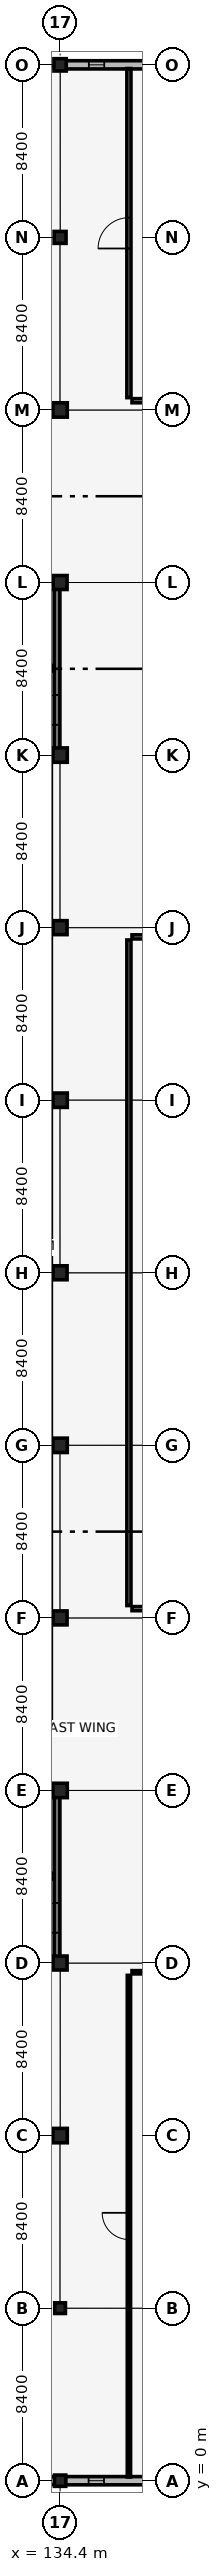
"""IFC4 building model, lengths in metres.
Left out: names, types, materials, properties, quantities, classifications, styles, units other than length and angle.
Written with IfcOpenShell. Run it as: python <this file> out.ifc"""

import sys

from ifc_helpers import new_model, si_unit, direction, frame, frame_2d, origin, origin_2d, place, context, subcontext, project, spatial, rectangle, extrude, element, fill, save


model = new_model("IFC4")
c1 = context("Model", 3, precision=1e-05, world=origin(), true_north=direction((0.0, 1.0)))
c2 = subcontext(c1, "Body", "Model", "MODEL_VIEW")
j1 = project(units=[si_unit("LENGTHUNIT", "METRE"), si_unit("PLANEANGLEUNIT", "RADIAN")], contexts=[c1])
p1 = place(None, origin())
s1 = spatial("IfcSite", under=j1, at=p1, CompositionType="ELEMENT")
p2 = place(p1, origin())
s2 = spatial("IfcBuilding", under=s1, at=p2, CompositionType="ELEMENT")
p3 = place(p2, frame((0.0, 0.0, 9.86)))
s3 = spatial("IfcBuildingStorey", under=s2, at=p3, CompositionType="ELEMENT", Elevation=9.86)
p4 = place(p3, frame((126.15, 25.35, 0.0), z_axis=(0.0, 0.0, 1.0), x_axis=(1.0, 0.0, 0.0)))
e1 = element("IfcWall", 1, at=p4, inside=s3, PredefinedType="SHEAR", context=c2, shape_type="SweptSolid", body=[
    extrude(rectangle(XDim=8.1, YDim=0.28, at=frame_2d((4.05, 0.0))), origin(), (0.0, 0.0, 1.0), 3.78),
])
p5 = place(p4, frame((0.485, 0.0, 0.0)))
e2 = element("IfcOpeningElement", 2, at=p5, cuts=e1, PredefinedType="OPENING", context=c2, shape_type="SweptSolid", body=[
    extrude(rectangle(XDim=1.0, YDim=2.15, at=frame_2d((0.5, 1.075))), frame((0.0, 0.15, 0.0), z_axis=(0.0, -1.0, 0.0), x_axis=(1.0, 0.0, 0.0)), (0.0, 0.0, 1.0), 0.3),
])
p6 = place(p3, frame((126.15, 33.45, 0.0), z_axis=(0.0, 0.0, 1.0), x_axis=(1.0, 0.0, 0.0)))
e3 = element("IfcWall", 3, at=p6, inside=s3, PredefinedType="SHEAR", context=c2, shape_type="SweptSolid", body=[
    extrude(rectangle(XDim=8.1, YDim=0.28, at=frame_2d((4.05, 0.0))), origin(), (0.0, 0.0, 1.0), 3.78),
])
p7 = place(p3, frame((134.25, 25.35, 0.0), z_axis=(0.0, 0.0, 1.0), x_axis=(0.0, 1.0, 0.0)))
e4 = element("IfcWall", 4, at=p7, inside=s3, PredefinedType="SHEAR", context=c2, shape_type="SweptSolid", body=[
    extrude(rectangle(XDim=8.1, YDim=0.28, at=frame_2d((4.05, 0.0))), origin(), (0.0, 0.0, 1.0), 3.78),
])
p8 = place(p7, frame((1.325, 0.0, 0.0)))
e5 = element("IfcOpeningElement", 5, at=p8, cuts=e4, PredefinedType="OPENING", context=c2, shape_type="SweptSolid", body=[
    extrude(rectangle(XDim=1.45, YDim=2.15, at=frame_2d((0.725, 1.075))), frame((0.0, 0.15, 0.0), z_axis=(0.0, -1.0, 0.0), x_axis=(1.0, 0.0, 0.0)), (0.0, 0.0, 1.0), 0.3),
])
p9 = place(p3, frame((126.3, 29.43, 0.0), z_axis=(0.0, 0.0, 1.0), x_axis=(1.0, 0.0, 0.0)))
e6 = element("IfcWall", 6, at=p9, inside=s3, PredefinedType="SHEAR", context=c2, shape_type="SweptSolid", body=[
    extrude(rectangle(XDim=7.8, YDim=0.28, at=frame_2d((3.9, 0.0))), origin(), (0.0, 0.0, 1.0), 3.78),
])
p10 = place(p9, frame((6.2, 0.0, 0.0)))
e7 = element("IfcOpeningElement", 7, at=p10, cuts=e6, PredefinedType="OPENING", context=c2, shape_type="SweptSolid", body=[
    extrude(rectangle(XDim=1.35, YDim=2.15, at=frame_2d((0.675, 1.075))), frame((0.0, 0.15, 0.0), z_axis=(0.0, -1.0, 0.0), x_axis=(1.0, 0.0, 0.0)), (0.0, 0.0, 1.0), 0.3),
])
p11 = place(p3, frame((126.15, 84.15, 0.0), z_axis=(0.0, 0.0, 1.0), x_axis=(1.0, 0.0, 0.0)))
e8 = element("IfcWall", 8, at=p11, inside=s3, PredefinedType="SHEAR", context=c2, shape_type="SweptSolid", body=[
    extrude(rectangle(XDim=8.1, YDim=0.28, at=frame_2d((4.05, 0.0))), origin(), (0.0, 0.0, 1.0), 3.78),
])
p12 = place(p11, frame((0.485, 0.0, 0.0)))
e9 = element("IfcOpeningElement", 9, at=p12, cuts=e8, PredefinedType="OPENING", context=c2, shape_type="SweptSolid", body=[
    extrude(rectangle(XDim=1.0, YDim=2.15, at=frame_2d((0.5, 1.075))), frame((0.0, 0.15, 0.0), z_axis=(0.0, -1.0, 0.0), x_axis=(1.0, 0.0, 0.0)), (0.0, 0.0, 1.0), 0.3),
])
p13 = place(p3, frame((126.15, 92.25, 0.0), z_axis=(0.0, 0.0, 1.0), x_axis=(1.0, 0.0, 0.0)))
e10 = element("IfcWall", 10, at=p13, inside=s3, PredefinedType="SHEAR", context=c2, shape_type="SweptSolid", body=[
    extrude(rectangle(XDim=8.1, YDim=0.28, at=frame_2d((4.05, 0.0))), origin(), (0.0, 0.0, 1.0), 3.78),
])
p14 = place(p3, frame((134.25, 84.15, 0.0), z_axis=(0.0, 0.0, 1.0), x_axis=(0.0, 1.0, 0.0)))
e11 = element("IfcWall", 11, at=p14, inside=s3, PredefinedType="SHEAR", context=c2, shape_type="SweptSolid", body=[
    extrude(rectangle(XDim=8.1, YDim=0.28, at=frame_2d((4.05, 0.0))), origin(), (0.0, 0.0, 1.0), 3.78),
])
p15 = place(p14, frame((1.325, 0.0, 0.0)))
e12 = element("IfcOpeningElement", 12, at=p15, cuts=e11, PredefinedType="OPENING", context=c2, shape_type="SweptSolid", body=[
    extrude(rectangle(XDim=1.45, YDim=2.15, at=frame_2d((0.725, 1.075))), frame((0.0, 0.15, 0.0), z_axis=(0.0, -1.0, 0.0), x_axis=(1.0, 0.0, 0.0)), (0.0, 0.0, 1.0), 0.3),
])
p16 = place(p3, frame((126.3, 88.23, 0.0), z_axis=(0.0, 0.0, 1.0), x_axis=(1.0, 0.0, 0.0)))
e13 = element("IfcWall", 13, at=p16, inside=s3, PredefinedType="SHEAR", context=c2, shape_type="SweptSolid", body=[
    extrude(rectangle(XDim=7.8, YDim=0.28, at=frame_2d((3.9, 0.0))), origin(), (0.0, 0.0, 1.0), 3.78),
])
p17 = place(p16, frame((6.2, 0.0, 0.0)))
e14 = element("IfcOpeningElement", 14, at=p17, cuts=e13, PredefinedType="OPENING", context=c2, shape_type="SweptSolid", body=[
    extrude(rectangle(XDim=1.35, YDim=2.15, at=frame_2d((0.675, 1.075))), frame((0.0, 0.15, 0.0), z_axis=(0.0, -1.0, 0.0), x_axis=(1.0, 0.0, 0.0)), (0.0, 0.0, 1.0), 0.3),
])
p18 = place(p3, frame((134.4, 0.0, 0.0), z_axis=(0.0, 0.0, 1.0), x_axis=(1.0, 0.0, 0.0)))
e15 = element("IfcColumn", 15, at=p18, inside=s3, PredefinedType="COLUMN", context=c2, shape_type="SweptSolid", body=[
    extrude(rectangle(XDim=0.55, YDim=0.55, at=origin_2d()), origin(), (0.0, 0.0, 1.0), 3.78),
])
p19 = place(p3, frame((134.4, 8.4, 0.0), z_axis=(0.0, 0.0, 1.0), x_axis=(1.0, 0.0, 0.0)))
e16 = element("IfcColumn", 16, at=p19, inside=s3, PredefinedType="COLUMN", context=c2, shape_type="SweptSolid", body=[
    extrude(rectangle(XDim=0.52, YDim=0.52, at=origin_2d()), origin(), (0.0, 0.0, 1.0), 3.78),
])
p20 = place(p3, frame((134.4, 16.8, 0.0), z_axis=(0.0, 0.0, 1.0), x_axis=(1.0, 0.0, 0.0)))
e17 = element("IfcColumn", 17, at=p20, inside=s3, PredefinedType="COLUMN", context=c2, shape_type="SweptSolid", body=[
    extrude(rectangle(XDim=0.7, YDim=0.7, at=origin_2d()), origin(), (0.0, 0.0, 1.0), 3.78),
])
p21 = place(p3, frame((134.4, 25.2, 0.0), z_axis=(0.0, 0.0, 1.0), x_axis=(1.0, 0.0, 0.0)))
e18 = element("IfcColumn", 18, at=p21, inside=s3, PredefinedType="COLUMN", context=c2, shape_type="SweptSolid", body=[
    extrude(rectangle(XDim=0.68, YDim=0.68, at=origin_2d()), origin(), (0.0, 0.0, 1.0), 3.78),
])
p22 = place(p3, frame((134.4, 33.6, 0.0), z_axis=(0.0, 0.0, 1.0), x_axis=(1.0, 0.0, 0.0)))
e19 = element("IfcColumn", 19, at=p22, inside=s3, PredefinedType="COLUMN", context=c2, shape_type="SweptSolid", body=[
    extrude(rectangle(XDim=0.7, YDim=0.7, at=origin_2d()), origin(), (0.0, 0.0, 1.0), 3.78),
])
p23 = place(p3, frame((134.4, 42.0, 0.0), z_axis=(0.0, 0.0, 1.0), x_axis=(1.0, 0.0, 0.0)))
e20 = element("IfcColumn", 20, at=p23, inside=s3, PredefinedType="COLUMN", context=c2, shape_type="SweptSolid", body=[
    extrude(rectangle(XDim=0.68, YDim=0.68, at=origin_2d()), origin(), (0.0, 0.0, 1.0), 3.78),
])
p24 = place(p3, frame((134.4, 50.4, 0.0), z_axis=(0.0, 0.0, 1.0), x_axis=(1.0, 0.0, 0.0)))
e21 = element("IfcColumn", 21, at=p24, inside=s3, PredefinedType="COLUMN", context=c2, shape_type="SweptSolid", body=[
    extrude(rectangle(XDim=0.7, YDim=0.7, at=origin_2d()), origin(), (0.0, 0.0, 1.0), 3.78),
])
p25 = place(p3, frame((134.4, 58.8, 0.0), z_axis=(0.0, 0.0, 1.0), x_axis=(1.0, 0.0, 0.0)))
e22 = element("IfcColumn", 22, at=p25, inside=s3, PredefinedType="COLUMN", context=c2, shape_type="SweptSolid", body=[
    extrude(rectangle(XDim=0.68, YDim=0.68, at=origin_2d()), origin(), (0.0, 0.0, 1.0), 3.78),
])
p26 = place(p3, frame((134.4, 67.2, 0.0), z_axis=(0.0, 0.0, 1.0), x_axis=(1.0, 0.0, 0.0)))
e23 = element("IfcColumn", 23, at=p26, inside=s3, PredefinedType="COLUMN", context=c2, shape_type="SweptSolid", body=[
    extrude(rectangle(XDim=0.7, YDim=0.7, at=origin_2d()), origin(), (0.0, 0.0, 1.0), 3.78),
])
p27 = place(p3, frame((134.4, 75.6, 0.0), z_axis=(0.0, 0.0, 1.0), x_axis=(1.0, 0.0, 0.0)))
e24 = element("IfcColumn", 24, at=p27, inside=s3, PredefinedType="COLUMN", context=c2, shape_type="SweptSolid", body=[
    extrude(rectangle(XDim=0.68, YDim=0.68, at=origin_2d()), origin(), (0.0, 0.0, 1.0), 3.78),
])
p28 = place(p3, frame((134.4, 84.0, 0.0), z_axis=(0.0, 0.0, 1.0), x_axis=(1.0, 0.0, 0.0)))
e25 = element("IfcColumn", 25, at=p28, inside=s3, PredefinedType="COLUMN", context=c2, shape_type="SweptSolid", body=[
    extrude(rectangle(XDim=0.7, YDim=0.7, at=origin_2d()), origin(), (0.0, 0.0, 1.0), 3.78),
])
p29 = place(p3, frame((134.4, 92.4, 0.0), z_axis=(0.0, 0.0, 1.0), x_axis=(1.0, 0.0, 0.0)))
e26 = element("IfcColumn", 26, at=p29, inside=s3, PredefinedType="COLUMN", context=c2, shape_type="SweptSolid", body=[
    extrude(rectangle(XDim=0.68, YDim=0.68, at=origin_2d()), origin(), (0.0, 0.0, 1.0), 3.78),
])
p30 = place(p3, frame((134.4, 100.8, 0.0), z_axis=(0.0, 0.0, 1.0), x_axis=(1.0, 0.0, 0.0)))
e27 = element("IfcColumn", 27, at=p30, inside=s3, PredefinedType="COLUMN", context=c2, shape_type="SweptSolid", body=[
    extrude(rectangle(XDim=0.7, YDim=0.7, at=origin_2d()), origin(), (0.0, 0.0, 1.0), 3.78),
])
p31 = place(p3, frame((134.4, 109.2, 0.0), z_axis=(0.0, 0.0, 1.0), x_axis=(1.0, 0.0, 0.0)))
e28 = element("IfcColumn", 28, at=p31, inside=s3, PredefinedType="COLUMN", context=c2, shape_type="SweptSolid", body=[
    extrude(rectangle(XDim=0.58, YDim=0.58, at=origin_2d()), origin(), (0.0, 0.0, 1.0), 3.78),
])
p32 = place(p3, frame((134.4, 117.6, 0.0), z_axis=(0.0, 0.0, 1.0), x_axis=(1.0, 0.0, 0.0)))
e29 = element("IfcColumn", 29, at=p32, inside=s3, PredefinedType="COLUMN", context=c2, shape_type="SweptSolid", body=[
    extrude(rectangle(XDim=0.6, YDim=0.6, at=origin_2d()), origin(), (0.0, 0.0, 1.0), 3.78),
])
p33 = place(p3, frame((126.235, 0.0, 0.0), z_axis=(0.0, 0.0, 1.0), x_axis=(1.0, 0.0, 0.0)))
e30 = element("IfcWall", 30, at=p33, inside=s3, PredefinedType="SOLIDWALL", context=c2, shape_type="SweptSolid", body=[
    extrude(rectangle(XDim=7.905, YDim=0.38, at=frame_2d((3.952, 0.0))), origin(), (0.0, 0.0, 1.0), 3.01),
])
p34 = place(p33, frame((1.127, 0.0, 0.7)))
e31 = element("IfcOpeningElement", 31, at=p34, cuts=e30, PredefinedType="OPENING", context=c2, shape_type="SweptSolid", body=[
    extrude(rectangle(XDim=0.75, YDim=2.1, at=frame_2d((0.375, 1.05))), frame((0.0, 0.2, 0.0), z_axis=(0.0, -1.0, 0.0), x_axis=(1.0, 0.0, 0.0)), (0.0, 0.0, 1.0), 0.4),
])
p35 = place(p33, frame((2.708, 0.0, 0.7)))
e32 = element("IfcOpeningElement", 32, at=p35, cuts=e30, PredefinedType="OPENING", context=c2, shape_type="SweptSolid", body=[
    extrude(rectangle(XDim=0.75, YDim=2.1, at=frame_2d((0.375, 1.05))), frame((0.0, 0.2, 0.0), z_axis=(0.0, -1.0, 0.0), x_axis=(1.0, 0.0, 0.0)), (0.0, 0.0, 1.0), 0.4),
])
p36 = place(p33, frame((4.447, 0.0, 0.7)))
e33 = element("IfcOpeningElement", 33, at=p36, cuts=e30, PredefinedType="OPENING", context=c2, shape_type="SweptSolid", body=[
    extrude(rectangle(XDim=0.75, YDim=2.1, at=frame_2d((0.375, 1.05))), frame((0.0, 0.2, 0.0), z_axis=(0.0, -1.0, 0.0), x_axis=(1.0, 0.0, 0.0)), (0.0, 0.0, 1.0), 0.4),
])
p37 = place(p33, frame((6.028, 0.0, 0.7)))
e34 = element("IfcOpeningElement", 34, at=p37, cuts=e30, PredefinedType="OPENING", context=c2, shape_type="SweptSolid", body=[
    extrude(rectangle(XDim=0.75, YDim=2.1, at=frame_2d((0.375, 1.05))), frame((0.0, 0.2, 0.0), z_axis=(0.0, -1.0, 0.0), x_axis=(1.0, 0.0, 0.0)), (0.0, 0.0, 1.0), 0.4),
])
p38 = place(p3, frame((134.66, 0.0, 0.0), z_axis=(0.0, 0.0, 1.0), x_axis=(1.0, 0.0, 0.0)))
e35 = element("IfcWall", 35, at=p38, inside=s3, PredefinedType="SOLIDWALL", context=c2, shape_type="SweptSolid", body=[
    extrude(rectangle(XDim=7.905, YDim=0.4, at=frame_2d((3.953, 0.0))), origin(), (0.0, 0.0, 1.0), 3.01),
])
p39 = place(p38, frame((1.127, 0.0, 0.7)))
e36 = element("IfcOpeningElement", 36, at=p39, cuts=e35, PredefinedType="OPENING", context=c2, shape_type="SweptSolid", body=[
    extrude(rectangle(XDim=0.75, YDim=2.1, at=frame_2d((0.375, 1.05))), frame((0.0, 0.21, 0.0), z_axis=(0.0, -1.0, 0.0), x_axis=(1.0, 0.0, 0.0)), (0.0, 0.0, 1.0), 0.42),
])
p40 = place(p38, frame((4.447, 0.0, 0.7)))
e37 = element("IfcOpeningElement", 37, at=p40, cuts=e35, PredefinedType="OPENING", context=c2, shape_type="SweptSolid", body=[
    extrude(rectangle(XDim=0.75, YDim=2.1, at=frame_2d((0.375, 1.05))), frame((0.0, 0.21, 0.0), z_axis=(0.0, -1.0, 0.0), x_axis=(1.0, 0.0, 0.0)), (0.0, 0.0, 1.0), 0.42),
])
p41 = place(p38, frame((6.028, 0.0, 0.7)))
e38 = element("IfcOpeningElement", 38, at=p41, cuts=e35, PredefinedType="OPENING", context=c2, shape_type="SweptSolid", body=[
    extrude(rectangle(XDim=0.75, YDim=2.1, at=frame_2d((0.375, 1.05))), frame((0.0, 0.21, 0.0), z_axis=(0.0, -1.0, 0.0), x_axis=(1.0, 0.0, 0.0)), (0.0, 0.0, 1.0), 0.42),
])
p42 = place(p3, frame((134.685, 117.6, 0.0), z_axis=(0.0, 0.0, 1.0), x_axis=(1.0, 0.0, 0.0)))
e39 = element("IfcWall", 39, at=p42, inside=s3, PredefinedType="SOLIDWALL", context=c2, shape_type="SweptSolid", body=[
    extrude(rectangle(XDim=7.84, YDim=0.4, at=frame_2d((3.92, 0.0))), origin(), (0.0, 0.0, 1.0), 3.01),
])
p43 = place(p42, frame((1.115, 0.0, 0.7)))
e40 = element("IfcOpeningElement", 40, at=p43, cuts=e39, PredefinedType="OPENING", context=c2, shape_type="SweptSolid", body=[
    extrude(rectangle(XDim=0.75, YDim=2.1, at=frame_2d((0.375, 1.05))), frame((0.0, 0.21, 0.0), z_axis=(0.0, -1.0, 0.0), x_axis=(1.0, 0.0, 0.0)), (0.0, 0.0, 1.0), 0.42),
])
p44 = place(p42, frame((4.407, 0.0, 0.7)))
e41 = element("IfcOpeningElement", 41, at=p44, cuts=e39, PredefinedType="OPENING", context=c2, shape_type="SweptSolid", body=[
    extrude(rectangle(XDim=0.75, YDim=2.1, at=frame_2d((0.375, 1.05))), frame((0.0, 0.21, 0.0), z_axis=(0.0, -1.0, 0.0), x_axis=(1.0, 0.0, 0.0)), (0.0, 0.0, 1.0), 0.42),
])
p45 = place(p42, frame((5.975, 0.0, 0.7)))
e42 = element("IfcOpeningElement", 42, at=p45, cuts=e39, PredefinedType="OPENING", context=c2, shape_type="SweptSolid", body=[
    extrude(rectangle(XDim=0.75, YDim=2.1, at=frame_2d((0.375, 1.05))), frame((0.0, 0.21, 0.0), z_axis=(0.0, -1.0, 0.0), x_axis=(1.0, 0.0, 0.0)), (0.0, 0.0, 1.0), 0.42),
])
p46 = place(p3, frame((137.75, 0.18, 0.0), z_axis=(0.0, 0.0, 1.0), x_axis=(0.0, 1.0, 0.0)))
e43 = element("IfcWall", 43, at=p46, inside=s3, PredefinedType="PARTITIONING", context=c2, shape_type="SweptSolid", body=[
    extrude(rectangle(XDim=24.42, YDim=0.16, at=frame_2d((12.21, 0.0))), origin(), (0.0, 0.0, 1.0), 2.91),
])
p47 = place(p46, frame((11.56, 0.0, 0.0)))
e44 = element("IfcOpeningElement", 44, at=p47, cuts=e43, PredefinedType="OPENING", context=c2, shape_type="SweptSolid", body=[
    extrude(rectangle(XDim=1.3, YDim=2.2, at=frame_2d((0.65, 1.1))), frame((0.0, 0.09, 0.0), z_axis=(0.0, -1.0, 0.0), x_axis=(1.0, 0.0, 0.0)), (0.0, 0.0, 1.0), 0.18),
])
p48 = place(p3, frame((137.9, 24.75, 0.0), z_axis=(0.0, 0.0, 1.0), x_axis=(1.0, 0.0, 0.0)))
e45 = element("IfcWall", 45, at=p48, inside=s3, PredefinedType="PARTITIONING", context=c2, shape_type="SweptSolid", body=[
    extrude(rectangle(XDim=4.49, YDim=0.16, at=frame_2d((2.245, 0.0))), origin(), (0.0, 0.0, 1.0), 3.78),
])
p49 = place(p3, frame((137.9, 75.15, 0.0), z_axis=(0.0, 0.0, 1.0), x_axis=(1.0, 0.0, 0.0)))
e46 = element("IfcWall", 46, at=p49, inside=s3, PredefinedType="PARTITIONING", context=c2, shape_type="SweptSolid", body=[
    extrude(rectangle(XDim=4.49, YDim=0.2, at=frame_2d((2.245, 0.0))), origin(), (0.0, 0.0, 1.0), 3.78),
])
p50 = place(p49, frame((1.495, 0.0, 0.0)))
e47 = element("IfcOpeningElement", 47, at=p50, cuts=e46, PredefinedType="OPENING", context=c2, shape_type="SweptSolid", body=[
    extrude(rectangle(XDim=1.5, YDim=2.2, at=frame_2d((0.75, 1.1))), frame((0.0, 0.11, 0.0), z_axis=(0.0, -1.0, 0.0), x_axis=(1.0, 0.0, 0.0)), (0.0, 0.0, 1.0), 0.22),
])
p51 = place(p3, frame((137.75, 42.6, 0.0), z_axis=(0.0, 0.0, 1.0), x_axis=(0.0, 1.0, 0.0)))
e48 = element("IfcWall", 48, at=p51, inside=s3, PredefinedType="PARTITIONING", context=c2, shape_type="SweptSolid", body=[
    extrude(rectangle(XDim=32.4, YDim=0.2, at=frame_2d((16.2, 0.0))), origin(), (0.0, 0.0, 1.0), 2.91),
])
p52 = place(p3, frame((137.9, 42.45, 0.0), z_axis=(0.0, 0.0, 1.0), x_axis=(1.0, 0.0, 0.0)))
e49 = element("IfcWall", 49, at=p52, inside=s3, PredefinedType="PARTITIONING", context=c2, shape_type="SweptSolid", body=[
    extrude(rectangle(XDim=4.49, YDim=0.2, at=frame_2d((2.245, 0.0))), origin(), (0.0, 0.0, 1.0), 3.78),
])
p53 = place(p3, frame((137.75, 101.4, 0.0), z_axis=(0.0, 0.0, 1.0), x_axis=(0.0, 1.0, 0.0)))
e50 = element("IfcWall", 50, at=p53, inside=s3, PredefinedType="PARTITIONING", context=c2, shape_type="SweptSolid", body=[
    extrude(rectangle(XDim=16.02, YDim=0.2, at=frame_2d((8.01, 0.0))), origin(), (0.0, 0.0, 1.0), 2.95),
])
p54 = place(p53, frame((7.26, 0.0, 0.0)))
e51 = element("IfcOpeningElement", 51, at=p54, cuts=e50, PredefinedType="OPENING", context=c2, shape_type="SweptSolid", body=[
    extrude(rectangle(XDim=1.5, YDim=2.2, at=frame_2d((0.75, 1.1))), frame((0.0, 0.11, 0.0), z_axis=(0.0, -1.0, 0.0), x_axis=(1.0, 0.0, 0.0)), (0.0, 0.0, 1.0), 0.22),
])
p55 = place(p3, frame((137.9, 101.25, 0.0), z_axis=(0.0, 0.0, 1.0), x_axis=(1.0, 0.0, 0.0)))
e52 = element("IfcWall", 52, at=p55, inside=s3, PredefinedType="PARTITIONING", context=c2, shape_type="SweptSolid", body=[
    extrude(rectangle(XDim=4.5, YDim=0.2, at=frame_2d((2.25, 0.0))), origin(), (0.0, 0.0, 1.0), 3.78),
])
p56 = place(p39, origin())
e53 = element("IfcWindow", 53, at=p56, inside=s3, PartitioningType="DOUBLE_PANEL_VERTICAL", PredefinedType="WINDOW", context=c2, shape_type="SweptSolid", body=[
    extrude(rectangle(XDim=0.75, YDim=2.1, at=frame_2d((0.375, 1.05))), frame((0.0, 0.03, 0.0), z_axis=(0.0, -1.0, 0.0), x_axis=(1.0, 0.0, 0.0)), (0.0, 0.0, 1.0), 0.06),
])
fill(e36, e53)
p57 = place(p43, origin())
e54 = element("IfcWindow", 54, at=p57, inside=s3, PartitioningType="DOUBLE_PANEL_VERTICAL", PredefinedType="WINDOW", context=c2, shape_type="SweptSolid", body=[
    extrude(rectangle(XDim=0.75, YDim=2.1, at=frame_2d((0.375, 1.05))), frame((0.0, 0.03, 0.0), z_axis=(0.0, -1.0, 0.0), x_axis=(1.0, 0.0, 0.0)), (0.0, 0.0, 1.0), 0.06),
])
fill(e40, e54)
p58 = place(p8, origin())
e55 = element("IfcDoor", 55, at=p58, inside=s3, OperationType="DOUBLE_DOOR_SINGLE_SWING", PredefinedType="DOOR", context=c2, shape_type="SweptSolid", body=[
    extrude(rectangle(XDim=1.45, YDim=2.15, at=frame_2d((0.725, 1.075))), frame((0.0, 0.025, 0.0), z_axis=(0.0, -1.0, 0.0), x_axis=(1.0, 0.0, 0.0)), (0.0, 0.0, 1.0), 0.05),
])
fill(e5, e55)
p59 = place(p15, origin())
e56 = element("IfcDoor", 56, at=p59, inside=s3, OperationType="DOUBLE_DOOR_SINGLE_SWING", PredefinedType="DOOR", context=c2, shape_type="SweptSolid", body=[
    extrude(rectangle(XDim=1.45, YDim=2.15, at=frame_2d((0.725, 1.075))), frame((0.0, 0.025, 0.0), z_axis=(0.0, -1.0, 0.0), x_axis=(1.0, 0.0, 0.0)), (0.0, 0.0, 1.0), 0.05),
])
fill(e12, e56)
p60 = place(p47, origin())
e57 = element("IfcDoor", 57, at=p60, inside=s3, OperationType="SINGLE_SWING_RIGHT", PredefinedType="DOOR", context=c2, shape_type="SweptSolid", body=[
    extrude(rectangle(XDim=1.3, YDim=2.2, at=frame_2d((0.65, 1.1))), frame((0.0, 0.025, 0.0), z_axis=(0.0, -1.0, 0.0), x_axis=(1.0, 0.0, 0.0)), (0.0, 0.0, 1.0), 0.05),
])
fill(e44, e57)
p61 = place(p54, origin())
e58 = element("IfcDoor", 58, at=p61, inside=s3, OperationType="DOUBLE_DOOR_SINGLE_SWING", PredefinedType="DOOR", context=c2, shape_type="SweptSolid", body=[
    extrude(rectangle(XDim=1.5, YDim=2.2, at=frame_2d((0.75, 1.1))), frame((0.0, 0.025, 0.0), z_axis=(0.0, -1.0, 0.0), x_axis=(1.0, 0.0, 0.0)), (0.0, 0.0, 1.0), 0.05),
])
fill(e51, e58)
save(model, sys.argv[1])
